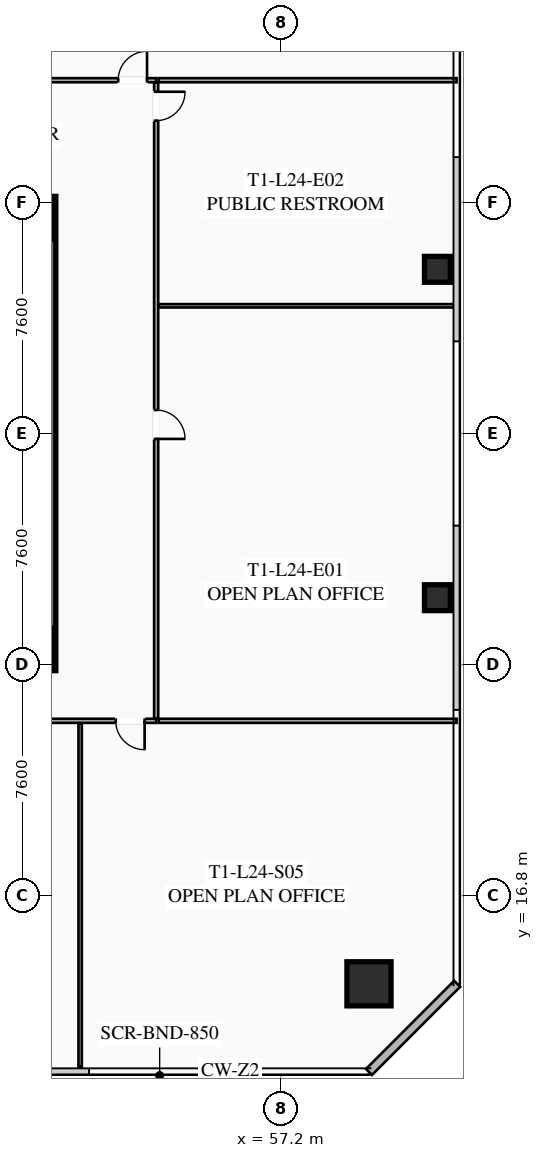
"""IFC4 building model, lengths in metres.
Left out: names, types, materials, properties, quantities, classifications, styles, units other than length and angle.
Written with IfcOpenShell. Run it as: python <this file> out.ifc"""

import sys

from ifc_helpers import new_model, si_unit, direction, frame, frame_2d, origin, origin_2d, place, context, subcontext, project, spatial, rectangle, hollow_rectangle, extrude, element, fill, save


model = new_model("IFC4")
c1 = context("Model", 3, precision=1e-05, world=origin(), true_north=direction((0.0, 1.0)))
c2 = subcontext(c1, "Body", "Model", "MODEL_VIEW")
j1 = project(units=[si_unit("LENGTHUNIT", "METRE"), si_unit("PLANEANGLEUNIT", "RADIAN")], contexts=[c1])
p1 = place(None, origin())
s1 = spatial("IfcSite", under=j1, at=p1, CompositionType="ELEMENT")
p2 = place(p1, origin())
s2 = spatial("IfcBuilding", under=s1, at=p2, CompositionType="ELEMENT")
p3 = place(p2, frame((0.0, 0.0, 92.05)))
s3 = spatial("IfcBuildingStorey", under=s2, at=p3, CompositionType="ELEMENT", Elevation=92.05)
p4 = place(p3, frame((49.475, 39.8, 0.0), z_axis=(0.0, 0.0, 1.0), x_axis=(0.0, -1.0, 0.0)))
e1 = element("IfcWall", 1, at=p4, inside=s3, PredefinedType="SHEAR", context=c2, shape_type="SweptSolid", body=[
    extrude(rectangle(XDim=15.6, YDim=0.65, at=frame_2d((7.8, 0.0))), origin(), (0.0, 0.0, 1.0), 3.55),
])
for number, where, z_axis, x_axis in (
    (2, (49.05, 24.95, 0.0), (0.0, 0.0, 1.0), (1.0, 0.0, 0.0)),
    (3, (49.05, 39.05, 0.0), (0.0, 0.0, 1.0), (1.0, 0.0, 0.0)),
):
    element("IfcColumn", number, at=place(p3, frame(where, z_axis=z_axis, x_axis=x_axis)), inside=s3, PredefinedType="COLUMN", context=c2, shape_type="SweptSolid", body=[
        extrude(hollow_rectangle(XDim=1.3, YDim=1.3, WallThickness=0.05, at=origin_2d()), origin(), (0.0, 0.0, 1.0), 3.35),
    ])
p5 = place(p3, frame((60.1, 13.9, 0.0), z_axis=(0.0, 0.0, 1.0), x_axis=(1.0, 0.0, 0.0)))
e4 = element("IfcColumn", 4, at=p5, inside=s3, PredefinedType="COLUMN", context=c2, shape_type="SweptSolid", body=[
    extrude(hollow_rectangle(XDim=1.45, YDim=1.45, WallThickness=0.055, at=origin_2d()), origin(), (0.0, 0.0, 1.0), 3.35),
])
for number, where, z_axis, x_axis in (
    (5, (62.35, 26.6, 0.0), (0.0, 0.0, 1.0), (1.0, 0.0, 0.0)),
    (6, (62.35, 37.4, 0.0), (0.0, 0.0, 1.0), (1.0, 0.0, 0.0)),
):
    element("IfcColumn", number, at=place(p3, frame(where, z_axis=z_axis, x_axis=x_axis)), inside=s3, PredefinedType="COLUMN", context=c2, shape_type="SweptSolid", body=[
        extrude(hollow_rectangle(XDim=0.85, YDim=0.85, WallThickness=0.035, at=origin_2d()), origin(), (0.0, 0.0, 1.0), 3.35),
    ])
p6 = place(p3, frame((63.0, 13.9, 0.0), z_axis=(0.0, 0.0, 1.0), x_axis=(-0.707106781187, -0.707106781187, 0.0)))
e7 = element("IfcWall", 7, at=p6, inside=s3, PredefinedType="SOLIDWALL", context=c2, shape_type="SweptSolid", body=[
    extrude(rectangle(XDim=4.101, YDim=0.28, at=frame_2d((2.051, 0.0))), origin(), (0.0, 0.0, 1.0), 3.35),
])
p7 = place(p3, frame((24.05, 43.62, 0.0), z_axis=(0.0, 0.0, 1.0), x_axis=(1.0, 0.0, 0.0)))
e8 = element("IfcWall", 8, at=p7, inside=s3, PredefinedType="PARTITIONING", context=c2, shape_type="SweptSolid", body=[
    extrude(rectangle(XDim=29.05, YDim=0.135, at=frame_2d((14.525, 0.0))), origin(), (0.0, 0.0, 1.0), 2.703),
])
p8 = place(p7, frame((0.3, 0.0, 0.0)))
e9 = element("IfcOpeningElement", 9, at=p8, cuts=e8, PredefinedType="OPENING", context=c2, shape_type="SweptSolid", body=[
    extrude(rectangle(XDim=0.95, YDim=2.05, at=frame_2d((0.475, 1.025))), frame((0.0, 0.077, 0.0), z_axis=(0.0, -1.0, 0.0), x_axis=(1.0, 0.0, 0.0)), (0.0, 0.0, 1.0), 0.155),
])
p9 = place(p7, frame((27.8, 0.0, 0.0)))
e10 = element("IfcOpeningElement", 10, at=p9, cuts=e8, PredefinedType="OPENING", context=c2, shape_type="SweptSolid", body=[
    extrude(rectangle(XDim=0.95, YDim=2.05, at=frame_2d((0.475, 1.025))), frame((0.0, 0.077, 0.0), z_axis=(0.0, -1.0, 0.0), x_axis=(1.0, 0.0, 0.0)), (0.0, 0.0, 1.0), 0.155),
])
p10 = place(p3, frame((53.1, 22.55, 0.0), z_axis=(0.0, 0.0, 1.0), x_axis=(-1.0, 0.0, 0.0)))
e11 = element("IfcWall", 11, at=p10, inside=s3, PredefinedType="PARTITIONING", context=c2, shape_type="SweptSolid", body=[
    extrude(rectangle(XDim=29.05, YDim=0.135, at=frame_2d((14.525, 0.0))), origin(), (0.0, 0.0, 1.0), 2.703),
])
p11 = place(p10, frame((27.72, 0.0, 0.0)))
e12 = element("IfcOpeningElement", 12, at=p11, cuts=e11, PredefinedType="OPENING", context=c2, shape_type="SweptSolid", body=[
    extrude(rectangle(XDim=0.95, YDim=2.05, at=frame_2d((0.475, 1.025))), frame((0.0, 0.077, 0.0), z_axis=(0.0, -1.0, 0.0), x_axis=(1.0, 0.0, 0.0)), (0.0, 0.0, 1.0), 0.155),
])
p12 = place(p10, frame((14.601, 0.0, 0.0)))
e13 = element("IfcOpeningElement", 13, at=p12, cuts=e11, PredefinedType="OPENING", context=c2, shape_type="SweptSolid", body=[
    extrude(rectangle(XDim=0.95, YDim=2.05, at=frame_2d((0.475, 1.025))), frame((0.0, 0.077, 0.0), z_axis=(0.0, -1.0, 0.0), x_axis=(1.0, 0.0, 0.0)), (0.0, 0.0, 1.0), 0.155),
])
p13 = place(p10, frame((10.351, 0.0, 0.0)))
e14 = element("IfcOpeningElement", 14, at=p13, cuts=e11, PredefinedType="OPENING", context=c2, shape_type="SweptSolid", body=[
    extrude(rectangle(XDim=0.95, YDim=2.05, at=frame_2d((0.475, 1.025))), frame((0.0, 0.077, 0.0), z_axis=(0.0, -1.0, 0.0), x_axis=(1.0, 0.0, 0.0)), (0.0, 0.0, 1.0), 0.155),
])
p14 = place(p10, frame((6.37, 0.0, 0.0)))
e15 = element("IfcOpeningElement", 15, at=p14, cuts=e11, PredefinedType="OPENING", context=c2, shape_type="SweptSolid", body=[
    extrude(rectangle(XDim=0.95, YDim=2.05, at=frame_2d((0.475, 1.025))), frame((0.0, 0.077, 0.0), z_axis=(0.0, -1.0, 0.0), x_axis=(1.0, 0.0, 0.0)), (0.0, 0.0, 1.0), 0.155),
])
p15 = place(p10, frame((0.38, 0.0, 0.0)))
e16 = element("IfcOpeningElement", 16, at=p15, cuts=e11, PredefinedType="OPENING", context=c2, shape_type="SweptSolid", body=[
    extrude(rectangle(XDim=0.95, YDim=2.05, at=frame_2d((0.475, 1.025))), frame((0.0, 0.077, 0.0), z_axis=(0.0, -1.0, 0.0), x_axis=(1.0, 0.0, 0.0)), (0.0, 0.0, 1.0), 0.155),
])
p16 = place(p3, frame((50.6, 11.17, 0.0), z_axis=(0.0, 0.0, 1.0), x_axis=(0.0, 1.0, 0.0)))
e17 = element("IfcWall", 17, at=p16, inside=s3, PredefinedType="PARTITIONING", context=c2, shape_type="SweptSolid", body=[
    extrude(rectangle(XDim=11.3, YDim=0.11, at=frame_2d((5.65, 0.0))), origin(), (0.0, 0.0, 1.0), 2.703),
])
p17 = place(p3, frame((53.1, 43.54, 0.0), z_axis=(0.0, 0.0, 1.0), x_axis=(0.0, -1.0, 0.0)))
e18 = element("IfcWall", 18, at=p17, inside=s3, PredefinedType="PARTITIONING", context=c2, shape_type="SweptSolid", body=[
    extrude(rectangle(XDim=20.91, YDim=0.135, at=frame_2d((10.455, 0.0))), origin(), (0.0, 0.0, 1.0), 2.703),
])
p18 = place(p17, frame((10.769, 0.0, 0.0)))
e19 = element("IfcOpeningElement", 19, at=p18, cuts=e18, PredefinedType="OPENING", context=c2, shape_type="SweptSolid", body=[
    extrude(rectangle(XDim=0.95, YDim=2.05, at=frame_2d((0.475, 1.025))), frame((0.0, 0.077, 0.0), z_axis=(0.0, -1.0, 0.0), x_axis=(1.0, 0.0, 0.0)), (0.0, 0.0, 1.0), 0.155),
])
p19 = place(p17, frame((0.3, 0.0, 0.0)))
e20 = element("IfcOpeningElement", 20, at=p19, cuts=e18, PredefinedType="OPENING", context=c2, shape_type="SweptSolid", body=[
    extrude(rectangle(XDim=0.95, YDim=2.05, at=frame_2d((0.475, 1.025))), frame((0.0, 0.077, 0.0), z_axis=(0.0, -1.0, 0.0), x_axis=(1.0, 0.0, 0.0)), (0.0, 0.0, 1.0), 0.155),
])
for number, where, z_axis, x_axis in (
    (21, (62.98, 43.62, 0.0), (0.0, 0.0, 1.0), (-1.0, 0.0, 0.0)),
    (22, (53.18, 22.55, 0.0), (0.0, 0.0, 1.0), (1.0, 0.0, 0.0)),
):
    element("IfcWall", number, at=place(p3, frame(where, z_axis=z_axis, x_axis=x_axis)), inside=s3, PredefinedType="PARTITIONING", context=c2, shape_type="SweptSolid", body=[
        extrude(rectangle(XDim=9.8, YDim=0.135, at=frame_2d((4.9, 0.0))), origin(), (0.0, 0.0, 1.0), 2.703),
    ])
p20 = place(p3, frame((53.18, 36.2, 0.0), z_axis=(0.0, 0.0, 1.0), x_axis=(1.0, 0.0, 0.0)))
e23 = element("IfcWall", 23, at=p20, inside=s3, PredefinedType="PARTITIONING", context=c2, shape_type="SweptSolid", body=[
    extrude(rectangle(XDim=9.8, YDim=0.11, at=frame_2d((4.9, 0.0))), origin(), (0.0, 0.0, 1.0), 2.703),
])
p21 = place(p9, origin())
e24 = element("IfcDoor", 24, at=p21, inside=s3, OperationType="SINGLE_SWING_RIGHT", PredefinedType="DOOR", context=c2, shape_type="SweptSolid", body=[
    extrude(rectangle(XDim=0.95, YDim=2.05, at=frame_2d((0.475, 1.025))), frame((0.0, 0.025, 0.0), z_axis=(0.0, -1.0, 0.0), x_axis=(1.0, 0.0, 0.0)), (0.0, 0.0, 1.0), 0.05),
])
fill(e10, e24)
p22 = place(p15, origin())
e25 = element("IfcDoor", 25, at=p22, inside=s3, OperationType="SINGLE_SWING_LEFT", PredefinedType="DOOR", context=c2, shape_type="SweptSolid", body=[
    extrude(rectangle(XDim=0.95, YDim=2.05, at=frame_2d((0.475, 1.025))), frame((0.0, 0.025, 0.0), z_axis=(0.0, -1.0, 0.0), x_axis=(1.0, 0.0, 0.0)), (0.0, 0.0, 1.0), 0.05),
])
fill(e16, e25)
p23 = place(p18, origin())
e26 = element("IfcDoor", 26, at=p23, inside=s3, OperationType="SINGLE_SWING_RIGHT", PredefinedType="DOOR", context=c2, shape_type="SweptSolid", body=[
    extrude(rectangle(XDim=0.95, YDim=2.05, at=frame_2d((0.475, 1.025))), frame((0.0, 0.025, 0.0), z_axis=(0.0, -1.0, 0.0), x_axis=(1.0, 0.0, 0.0)), (0.0, 0.0, 1.0), 0.05),
])
fill(e19, e26)
p24 = place(p19, origin())
e27 = element("IfcDoor", 27, at=p24, inside=s3, OperationType="SINGLE_SWING_LEFT", PredefinedType="DOOR", context=c2, shape_type="SweptSolid", body=[
    extrude(rectangle(XDim=0.95, YDim=2.05, at=frame_2d((0.475, 1.025))), frame((0.0, 0.025, 0.0), z_axis=(0.0, -1.0, 0.0), x_axis=(1.0, 0.0, 0.0)), (0.0, 0.0, 1.0), 0.05),
])
fill(e20, e27)
save(model, sys.argv[1])
